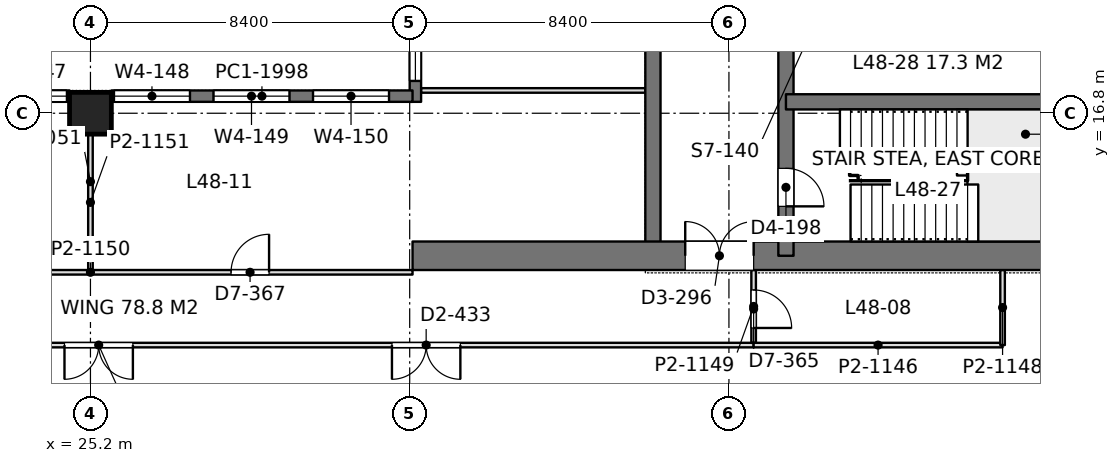
"""IFC4 building model, lengths in metres.
Left out: names, types, materials, properties, quantities, classifications, styles, units other than length and angle.
Written with IfcOpenShell. Run it as: python <this file> out.ifc"""

import sys

from ifc_helpers import new_model, si_unit, direction, frame, frame_2d, origin, origin_2d, place, context, subcontext, project, spatial, rectangle, extrude, element, fill, save


model = new_model("IFC4")
c1 = context("Model", 3, precision=1e-05, world=origin(), true_north=direction((0.0, 1.0)))
c2 = subcontext(c1, "Body", "Model", "MODEL_VIEW")
j1 = project(units=[si_unit("LENGTHUNIT", "METRE"), si_unit("PLANEANGLEUNIT", "RADIAN")], contexts=[c1])
p1 = place(None, origin())
s1 = spatial("IfcSite", under=j1, at=p1, CompositionType="ELEMENT")
p2 = place(p1, origin())
s2 = spatial("IfcBuilding", under=s1, at=p2, CompositionType="ELEMENT")
p3 = place(p2, frame((0.0, 0.0, 211.2)))
s3 = spatial("IfcBuildingStorey", under=s2, at=p3, CompositionType="ELEMENT", Elevation=211.2)
p4 = place(p3, frame((25.2, 16.8, 0.0), z_axis=(0.0, 0.0, 1.0), x_axis=(1.0, 0.0, 0.0)))
e1 = element("IfcColumn", 1, at=p4, inside=s3, PredefinedType="COLUMN", context=c2, shape_type="SweptSolid", body=[
    extrude(rectangle(XDim=1.1, YDim=1.1, at=origin_2d()), origin(), (0.0, 0.0, 1.0), 4.2),
])
p5 = place(p3, frame((33.675, 13.05, 0.0), z_axis=(0.0, 0.0, 1.0), x_axis=(1.0, 0.0, 0.0)))
e2 = element("IfcWall", 2, at=p5, inside=s3, PredefinedType="SHEAR", context=c2, shape_type="SweptSolid", body=[
    extrude(rectangle(XDim=17.85, YDim=0.75, at=frame_2d((8.925, 0.0))), origin(), (0.0, 0.0, 1.0), 4.2),
])
p6 = place(p5, frame((7.175, 0.0, 0.0)))
e3 = element("IfcOpeningElement", 3, at=p6, cuts=e2, PredefinedType="OPENING", context=c2, shape_type="SweptSolid", body=[
    extrude(rectangle(XDim=1.8, YDim=2.4, at=frame_2d((0.9, 1.2))), frame((0.0, 0.385, 0.0), z_axis=(0.0, -1.0, 0.0), x_axis=(1.0, 0.0, 0.0)), (0.0, 0.0, 1.0), 0.77),
])
p7 = place(p3, frame((43.5, 13.05, 0.0), z_axis=(0.0, 0.0, 1.0), x_axis=(0.0, 1.0, 0.0)))
e4 = element("IfcWall", 4, at=p7, inside=s3, PredefinedType="SHEAR", context=c2, shape_type="SweptSolid", body=[
    extrude(rectangle(XDim=24.3, YDim=0.4, at=frame_2d((12.15, 0.0))), origin(), (0.0, 0.0, 1.0), 4.2),
])
p8 = place(p7, frame((1.3, 0.0, 0.0)))
e5 = element("IfcOpeningElement", 5, at=p8, cuts=e4, PredefinedType="OPENING", context=c2, shape_type="SweptSolid", body=[
    extrude(rectangle(XDim=1.0, YDim=2.2, at=frame_2d((0.5, 1.1))), frame((0.0, 0.21, 0.0), z_axis=(0.0, -1.0, 0.0), x_axis=(1.0, 0.0, 0.0)), (0.0, 0.0, 1.0), 0.42),
])
p9 = place(p7, frame((22.0, 0.0, 0.0)))
e6 = element("IfcOpeningElement", 6, at=p9, cuts=e4, PredefinedType="OPENING", context=c2, shape_type="SweptSolid", body=[
    extrude(rectangle(XDim=1.0, YDim=2.2, at=frame_2d((0.5, 1.1))), frame((0.0, 0.21, 0.0), z_axis=(0.0, -1.0, 0.0), x_axis=(1.0, 0.0, 0.0)), (0.0, 0.0, 1.0), 0.42),
])
p10 = place(p7, frame((5.55, 0.0, 0.0)))
e7 = element("IfcOpeningElement", 7, at=p10, cuts=e4, PredefinedType="OPENING", context=c2, shape_type="SweptSolid", body=[
    extrude(rectangle(XDim=1.0, YDim=2.2, at=frame_2d((0.5, 1.1))), frame((0.0, 0.21, 0.0), z_axis=(0.0, -1.0, 0.0), x_axis=(1.0, 0.0, 0.0)), (0.0, 0.0, 1.0), 0.42),
])
p11 = place(p7, frame((9.55, 0.0, 0.0)))
e8 = element("IfcOpeningElement", 8, at=p11, cuts=e4, PredefinedType="OPENING", context=c2, shape_type="SweptSolid", body=[
    extrude(rectangle(XDim=1.0, YDim=2.2, at=frame_2d((0.5, 1.1))), frame((0.0, 0.21, 0.0), z_axis=(0.0, -1.0, 0.0), x_axis=(1.0, 0.0, 0.0)), (0.0, 0.0, 1.0), 0.42),
])
p12 = place(p7, frame((12.8, 0.0, 0.0)))
e9 = element("IfcOpeningElement", 9, at=p12, cuts=e4, PredefinedType="OPENING", context=c2, shape_type="SweptSolid", body=[
    extrude(rectangle(XDim=1.1, YDim=2.2, at=frame_2d((0.55, 1.1))), frame((0.0, 0.21, 0.0), z_axis=(0.0, -1.0, 0.0), x_axis=(1.0, 0.0, 0.0)), (0.0, 0.0, 1.0), 0.42),
])
p13 = place(p7, frame((15.538, 0.0, 0.0)))
e10 = element("IfcOpeningElement", 10, at=p13, cuts=e4, PredefinedType="OPENING", context=c2, shape_type="SweptSolid", body=[
    extrude(rectangle(XDim=1.1, YDim=2.2, at=frame_2d((0.55, 1.1))), frame((0.0, 0.21, 0.0), z_axis=(0.0, -1.0, 0.0), x_axis=(1.0, 0.0, 0.0)), (0.0, 0.0, 1.0), 0.42),
])
p14 = place(p7, frame((18.262, 0.0, 0.0)))
e11 = element("IfcOpeningElement", 11, at=p14, cuts=e4, PredefinedType="OPENING", context=c2, shape_type="SweptSolid", body=[
    extrude(rectangle(XDim=1.1, YDim=2.2, at=frame_2d((0.55, 1.1))), frame((0.0, 0.21, 0.0), z_axis=(0.0, -1.0, 0.0), x_axis=(1.0, 0.0, 0.0)), (0.0, 0.0, 1.0), 0.42),
])
p15 = place(p3, frame((40.0, 13.05, 0.0), z_axis=(0.0, 0.0, 1.0), x_axis=(0.0, 1.0, 0.0)))
e12 = element("IfcWall", 12, at=p15, inside=s3, PredefinedType="SHEAR", context=c2, shape_type="SweptSolid", body=[
    extrude(rectangle(XDim=24.3, YDim=0.4, at=frame_2d((12.15, 0.0))), origin(), (0.0, 0.0, 1.0), 4.2),
])
p16 = place(p15, frame((15.75, 0.0, 0.0)))
e13 = element("IfcOpeningElement", 13, at=p16, cuts=e12, PredefinedType="OPENING", context=c2, shape_type="SweptSolid", body=[
    extrude(rectangle(XDim=1.1, YDim=2.2, at=frame_2d((0.55, 1.1))), frame((0.0, 0.21, 0.0), z_axis=(0.0, -1.0, 0.0), x_axis=(1.0, 0.0, 0.0)), (0.0, 0.0, 1.0), 0.42),
])
p17 = place(p15, frame((18.6, 0.0, 0.0)))
e14 = element("IfcOpeningElement", 14, at=p17, cuts=e12, PredefinedType="OPENING", context=c2, shape_type="SweptSolid", body=[
    extrude(rectangle(XDim=1.1, YDim=2.2, at=frame_2d((0.55, 1.1))), frame((0.0, 0.21, 0.0), z_axis=(0.0, -1.0, 0.0), x_axis=(1.0, 0.0, 0.0)), (0.0, 0.0, 1.0), 0.42),
])
p18 = place(p15, frame((21.45, 0.0, 0.0)))
e15 = element("IfcOpeningElement", 15, at=p18, cuts=e12, PredefinedType="OPENING", context=c2, shape_type="SweptSolid", body=[
    extrude(rectangle(XDim=1.1, YDim=2.2, at=frame_2d((0.55, 1.1))), frame((0.0, 0.21, 0.0), z_axis=(0.0, -1.0, 0.0), x_axis=(1.0, 0.0, 0.0)), (0.0, 0.0, 1.0), 0.42),
])
p19 = place(p15, frame((6.05, 0.0, 0.0)))
e16 = element("IfcOpeningElement", 16, at=p19, cuts=e12, PredefinedType="OPENING", context=c2, shape_type="SweptSolid", body=[
    extrude(rectangle(XDim=1.8, YDim=2.4, at=frame_2d((0.9, 1.2))), frame((0.0, 0.21, 0.0), z_axis=(0.0, -1.0, 0.0), x_axis=(1.0, 0.0, 0.0)), (0.0, 0.0, 1.0), 0.42),
])
p20 = place(p15, frame((11.25, 0.0, 0.0)))
e17 = element("IfcOpeningElement", 17, at=p20, cuts=e12, PredefinedType="OPENING", context=c2, shape_type="SweptSolid", body=[
    extrude(rectangle(XDim=1.8, YDim=2.4, at=frame_2d((0.9, 1.2))), frame((0.0, 0.21, 0.0), z_axis=(0.0, -1.0, 0.0), x_axis=(1.0, 0.0, 0.0)), (0.0, 0.0, 1.0), 0.42),
])
p21 = place(p3, frame((51.15, 17.1, 0.0), z_axis=(0.0, 0.0, 1.0), x_axis=(-1.0, 0.0, 0.0)))
e18 = element("IfcWall", 18, at=p21, inside=s3, PredefinedType="SHEAR", context=c2, shape_type="SweptSolid", body=[
    extrude(rectangle(XDim=7.65, YDim=0.4, at=frame_2d((3.825, 0.0))), origin(), (0.0, 0.0, 1.0), 4.2),
])
p22 = place(p3, frame((33.75, 17.1, 0.0), z_axis=(0.0, 0.0, 1.0), x_axis=(0.0, 1.0, 0.0)))
e19 = element("IfcWall", 19, at=p22, inside=s3, PredefinedType="SOLIDWALL", context=c2, shape_type="SweptSolid", body=[
    extrude(rectangle(XDim=10.7, YDim=0.3, at=frame_2d((5.35, 0.0))), origin(), (0.0, 0.0, 1.0), 4.05),
])
p23 = place(p22, frame((0.55, 0.0, 0.9)))
e20 = element("IfcOpeningElement", 20, at=p23, cuts=e19, PredefinedType="OPENING", context=c2, shape_type="SweptSolid", body=[
    extrude(rectangle(XDim=2.0, YDim=1.9, at=frame_2d((1.0, 0.95))), frame((0.0, 0.16, 0.0), z_axis=(0.0, -1.0, 0.0), x_axis=(1.0, 0.0, 0.0)), (0.0, 0.0, 1.0), 0.32),
])
p24 = place(p22, frame((2.9, 0.0, 0.9)))
e21 = element("IfcOpeningElement", 21, at=p24, cuts=e19, PredefinedType="OPENING", context=c2, shape_type="SweptSolid", body=[
    extrude(rectangle(XDim=2.0, YDim=1.9, at=frame_2d((1.0, 0.95))), frame((0.0, 0.16, 0.0), z_axis=(0.0, -1.0, 0.0), x_axis=(1.0, 0.0, 0.0)), (0.0, 0.0, 1.0), 0.32),
])
p25 = place(p22, frame((7.675, 0.0, 0.9)))
e22 = element("IfcOpeningElement", 22, at=p25, cuts=e19, PredefinedType="OPENING", context=c2, shape_type="SweptSolid", body=[
    extrude(rectangle(XDim=2.0, YDim=1.9, at=frame_2d((1.0, 0.95))), frame((0.0, 0.16, 0.0), z_axis=(0.0, -1.0, 0.0), x_axis=(1.0, 0.0, 0.0)), (0.0, 0.0, 1.0), 0.32),
])
p26 = place(p3, frame((16.725, 17.25, 0.0), z_axis=(0.0, 0.0, 1.0), x_axis=(1.0, 0.0, 0.0)))
e23 = element("IfcWall", 23, at=p26, inside=s3, PredefinedType="SOLIDWALL", context=c2, shape_type="SweptSolid", body=[
    extrude(rectangle(XDim=7.925, YDim=0.3, at=frame_2d((3.962, 0.0))), origin(), (0.0, 0.0, 1.0), 4.05),
])
p27 = place(p26, frame((0.619, 0.0, 0.9)))
e24 = element("IfcOpeningElement", 24, at=p27, cuts=e23, PredefinedType="OPENING", context=c2, shape_type="SweptSolid", body=[
    extrude(rectangle(XDim=2.0, YDim=1.9, at=frame_2d((1.0, 0.95))), frame((0.0, 0.16, 0.0), z_axis=(0.0, -1.0, 0.0), x_axis=(1.0, 0.0, 0.0)), (0.0, 0.0, 1.0), 0.32),
])
p28 = place(p26, frame((3.238, 0.0, 0.9)))
e25 = element("IfcOpeningElement", 25, at=p28, cuts=e23, PredefinedType="OPENING", context=c2, shape_type="SweptSolid", body=[
    extrude(rectangle(XDim=2.0, YDim=1.9, at=frame_2d((1.0, 0.95))), frame((0.0, 0.16, 0.0), z_axis=(0.0, -1.0, 0.0), x_axis=(1.0, 0.0, 0.0)), (0.0, 0.0, 1.0), 0.32),
])
p29 = place(p26, frame((5.856, 0.0, 0.9)))
e26 = element("IfcOpeningElement", 26, at=p29, cuts=e23, PredefinedType="OPENING", context=c2, shape_type="SweptSolid", body=[
    extrude(rectangle(XDim=2.0, YDim=1.9, at=frame_2d((1.0, 0.95))), frame((0.0, 0.16, 0.0), z_axis=(0.0, -1.0, 0.0), x_axis=(1.0, 0.0, 0.0)), (0.0, 0.0, 1.0), 0.32),
])
p30 = place(p3, frame((25.75, 17.25, 0.0), z_axis=(0.0, 0.0, 1.0), x_axis=(1.0, 0.0, 0.0)))
e27 = element("IfcWall", 27, at=p30, inside=s3, PredefinedType="SOLIDWALL", context=c2, shape_type="SweptSolid", body=[
    extrude(rectangle(XDim=7.925, YDim=0.3, at=frame_2d((3.962, 0.0))), origin(), (0.0, 0.0, 1.0), 4.05),
])
p31 = place(p30, frame((0.069, 0.0, 0.9)))
e28 = element("IfcOpeningElement", 28, at=p31, cuts=e27, PredefinedType="OPENING", context=c2, shape_type="SweptSolid", body=[
    extrude(rectangle(XDim=2.0, YDim=1.9, at=frame_2d((1.0, 0.95))), frame((0.0, 0.16, 0.0), z_axis=(0.0, -1.0, 0.0), x_axis=(1.0, 0.0, 0.0)), (0.0, 0.0, 1.0), 0.32),
])
p32 = place(p30, frame((2.688, 0.0, 0.9)))
e29 = element("IfcOpeningElement", 29, at=p32, cuts=e27, PredefinedType="OPENING", context=c2, shape_type="SweptSolid", body=[
    extrude(rectangle(XDim=2.0, YDim=1.9, at=frame_2d((1.0, 0.95))), frame((0.0, 0.16, 0.0), z_axis=(0.0, -1.0, 0.0), x_axis=(1.0, 0.0, 0.0)), (0.0, 0.0, 1.0), 0.32),
])
p33 = place(p30, frame((5.306, 0.0, 0.9)))
e30 = element("IfcOpeningElement", 30, at=p33, cuts=e27, PredefinedType="OPENING", context=c2, shape_type="SweptSolid", body=[
    extrude(rectangle(XDim=2.0, YDim=1.9, at=frame_2d((1.0, 0.95))), frame((0.0, 0.16, 0.0), z_axis=(0.0, -1.0, 0.0), x_axis=(1.0, 0.0, 0.0)), (0.0, 0.0, 1.0), 0.32),
])
p34 = place(p3, frame((33.898, 17.4, 0.0), z_axis=(0.0, 0.0, 1.0), x_axis=(1.0, 0.0, 0.0)))
e31 = element("IfcWall", 31, at=p34, inside=s3, PredefinedType="PARTITIONING", context=c2, shape_type="SweptSolid", body=[
    extrude(rectangle(XDim=5.904, YDim=0.12, at=frame_2d((2.952, 0.0))), origin(), (0.0, 0.0, 1.0), 3.55),
])
p35 = place(p3, frame((1.2, 10.7, 0.0), z_axis=(0.0, 0.0, 1.0), x_axis=(1.0, 0.0, 0.0)))
e32 = element("IfcWall", 32, at=p35, inside=s3, PredefinedType="PARTITIONING", context=c2, shape_type="SweptSolid", body=[
    extrude(rectangle(XDim=41.452, YDim=0.12, at=frame_2d((20.726, 0.0))), origin(), (0.0, 0.0, 1.0), 3.55),
])
p36 = place(p35, frame((4.3, 0.0, 0.0)))
e33 = element("IfcOpeningElement", 33, at=p36, cuts=e32, PredefinedType="OPENING", context=c2, shape_type="SweptSolid", body=[
    extrude(rectangle(XDim=1.8, YDim=2.2, at=frame_2d((0.9, 1.1))), frame((0.0, 0.07, 0.0), z_axis=(0.0, -1.0, 0.0), x_axis=(1.0, 0.0, 0.0)), (0.0, 0.0, 1.0), 0.14),
])
p37 = place(p35, frame((9.5, 0.0, 0.0)))
e34 = element("IfcOpeningElement", 34, at=p37, cuts=e32, PredefinedType="OPENING", context=c2, shape_type="SweptSolid", body=[
    extrude(rectangle(XDim=1.8, YDim=2.2, at=frame_2d((0.9, 1.1))), frame((0.0, 0.07, 0.0), z_axis=(0.0, -1.0, 0.0), x_axis=(1.0, 0.0, 0.0)), (0.0, 0.0, 1.0), 0.14),
])
p38 = place(p35, frame((23.317, 0.0, 0.0)))
e35 = element("IfcOpeningElement", 35, at=p38, cuts=e32, PredefinedType="OPENING", context=c2, shape_type="SweptSolid", body=[
    extrude(rectangle(XDim=1.8, YDim=2.2, at=frame_2d((0.9, 1.1))), frame((0.0, 0.07, 0.0), z_axis=(0.0, -1.0, 0.0), x_axis=(1.0, 0.0, 0.0)), (0.0, 0.0, 1.0), 0.14),
])
p39 = place(p35, frame((31.933, 0.0, 0.0)))
e36 = element("IfcOpeningElement", 36, at=p39, cuts=e32, PredefinedType="OPENING", context=c2, shape_type="SweptSolid", body=[
    extrude(rectangle(XDim=1.8, YDim=2.2, at=frame_2d((0.9, 1.1))), frame((0.0, 0.07, 0.0), z_axis=(0.0, -1.0, 0.0), x_axis=(1.0, 0.0, 0.0)), (0.0, 0.0, 1.0), 0.14),
])
p40 = place(p3, frame((42.65, 10.758, 0.0), z_axis=(0.0, 0.0, 1.0), x_axis=(0.0, 1.0, 0.0)))
e37 = element("IfcWall", 37, at=p40, inside=s3, PredefinedType="PARTITIONING", context=c2, shape_type="SweptSolid", body=[
    extrude(rectangle(XDim=1.918, YDim=0.12, at=frame_2d((0.959, 0.0))), origin(), (0.0, 0.0, 1.0), 4.05),
])
p41 = place(p40, frame((0.392, 0.0, 0.0)))
e38 = element("IfcOpeningElement", 38, at=p41, cuts=e37, PredefinedType="OPENING", context=c2, shape_type="SweptSolid", body=[
    extrude(rectangle(XDim=1.0, YDim=2.4, at=frame_2d((0.5, 1.2))), frame((0.0, 0.07, 0.0), z_axis=(0.0, -1.0, 0.0), x_axis=(1.0, 0.0, 0.0)), (0.0, 0.0, 1.0), 0.14),
])
p42 = place(p3, frame((42.648, 10.7, 0.0), z_axis=(0.0, 0.0, 1.0), x_axis=(1.0, 0.0, 0.0)))
e39 = element("IfcWall", 39, at=p42, inside=s3, PredefinedType="PARTITIONING", context=c2, shape_type="SweptSolid", body=[
    extrude(rectangle(XDim=6.552, YDim=0.12, at=frame_2d((3.276, 0.0))), origin(), (0.0, 0.0, 1.0), 4.05),
])
p43 = place(p3, frame((49.2, 10.7, 0.0), z_axis=(0.0, 0.0, 1.0), x_axis=(0.0, 1.0, 0.0)))
e40 = element("IfcWall", 40, at=p43, inside=s3, PredefinedType="PARTITIONING", context=c2, shape_type="SweptSolid", body=[
    extrude(rectangle(XDim=1.976, YDim=0.12, at=frame_2d((0.988, 0.0))), origin(), (0.0, 0.0, 1.0), 4.05),
])
p44 = place(p3, frame((25.2, 12.658, 0.0), z_axis=(0.0, 0.0, 1.0), x_axis=(0.0, 1.0, 0.0)))
e41 = element("IfcWall", 41, at=p44, inside=s3, PredefinedType="PARTITIONING", context=c2, shape_type="SweptSolid", body=[
    extrude(rectangle(XDim=3.593, YDim=0.12, at=frame_2d((1.796, 0.0))), origin(), (0.0, 0.0, 1.0), 3.55),
])
p45 = place(p3, frame((16.725, 12.615, 0.0), z_axis=(0.0, 0.0, 1.0), x_axis=(1.0, 0.0, 0.0)))
e42 = element("IfcWall", 42, at=p45, inside=s3, PredefinedType="PARTITIONING", context=c2, shape_type="SweptSolid", body=[
    extrude(rectangle(XDim=16.95, YDim=0.12, at=frame_2d((8.475, 0.0))), origin(), (0.0, 0.0, 1.0), 3.55),
])
p46 = place(p45, frame((3.775, 0.0, 0.0)))
e43 = element("IfcOpeningElement", 43, at=p46, cuts=e42, PredefinedType="OPENING", context=c2, shape_type="SweptSolid", body=[
    extrude(rectangle(XDim=1.0, YDim=2.4, at=frame_2d((0.5, 1.2))), frame((0.0, 0.07, 0.0), z_axis=(0.0, -1.0, 0.0), x_axis=(1.0, 0.0, 0.0)), (0.0, 0.0, 1.0), 0.14),
])
p47 = place(p45, frame((12.175, 0.0, 0.0)))
e44 = element("IfcOpeningElement", 44, at=p47, cuts=e42, PredefinedType="OPENING", context=c2, shape_type="SweptSolid", body=[
    extrude(rectangle(XDim=1.0, YDim=2.4, at=frame_2d((0.5, 1.2))), frame((0.0, 0.07, 0.0), z_axis=(0.0, -1.0, 0.0), x_axis=(1.0, 0.0, 0.0)), (0.0, 0.0, 1.0), 0.14),
])
p48 = place(p23, origin())
e45 = element("IfcWindow", 45, at=p48, inside=s3, PartitioningType="SINGLE_PANEL", PredefinedType="WINDOW", context=c2, shape_type="SweptSolid", body=[
    extrude(rectangle(XDim=2.0, YDim=1.9, at=frame_2d((1.0, 0.95))), frame((0.0, 0.03, 0.0), z_axis=(0.0, -1.0, 0.0), x_axis=(1.0, 0.0, 0.0)), (0.0, 0.0, 1.0), 0.06),
])
fill(e20, e45)
p49 = place(p29, origin())
e46 = element("IfcWindow", 46, at=p49, inside=s3, PartitioningType="SINGLE_PANEL", PredefinedType="WINDOW", context=c2, shape_type="SweptSolid", body=[
    extrude(rectangle(XDim=2.0, YDim=1.9, at=frame_2d((1.0, 0.95))), frame((0.0, 0.03, 0.0), z_axis=(0.0, -1.0, 0.0), x_axis=(1.0, 0.0, 0.0)), (0.0, 0.0, 1.0), 0.06),
])
fill(e26, e46)
p50 = place(p31, origin())
e47 = element("IfcWindow", 47, at=p50, inside=s3, PartitioningType="SINGLE_PANEL", PredefinedType="WINDOW", context=c2, shape_type="SweptSolid", body=[
    extrude(rectangle(XDim=2.0, YDim=1.9, at=frame_2d((1.0, 0.95))), frame((0.0, 0.03, 0.0), z_axis=(0.0, -1.0, 0.0), x_axis=(1.0, 0.0, 0.0)), (0.0, 0.0, 1.0), 0.06),
])
fill(e28, e47)
p51 = place(p32, origin())
e48 = element("IfcWindow", 48, at=p51, inside=s3, PartitioningType="SINGLE_PANEL", PredefinedType="WINDOW", context=c2, shape_type="SweptSolid", body=[
    extrude(rectangle(XDim=2.0, YDim=1.9, at=frame_2d((1.0, 0.95))), frame((0.0, 0.03, 0.0), z_axis=(0.0, -1.0, 0.0), x_axis=(1.0, 0.0, 0.0)), (0.0, 0.0, 1.0), 0.06),
])
fill(e29, e48)
p52 = place(p33, origin())
e49 = element("IfcWindow", 49, at=p52, inside=s3, PartitioningType="SINGLE_PANEL", PredefinedType="WINDOW", context=c2, shape_type="SweptSolid", body=[
    extrude(rectangle(XDim=2.0, YDim=1.9, at=frame_2d((1.0, 0.95))), frame((0.0, 0.03, 0.0), z_axis=(0.0, -1.0, 0.0), x_axis=(1.0, 0.0, 0.0)), (0.0, 0.0, 1.0), 0.06),
])
fill(e30, e49)
p53 = place(p6, origin())
e50 = element("IfcDoor", 50, at=p53, inside=s3, OperationType="DOUBLE_DOOR_SINGLE_SWING", PredefinedType="DOOR", context=c2, shape_type="SweptSolid", body=[
    extrude(rectangle(XDim=1.8, YDim=2.4, at=frame_2d((0.9, 1.2))), frame((0.0, 0.025, 0.0), z_axis=(0.0, -1.0, 0.0), x_axis=(1.0, 0.0, 0.0)), (0.0, 0.0, 1.0), 0.05),
])
fill(e3, e50)
p54 = place(p8, frame((1.0, 0.0, 0.0), z_axis=(0.0, 0.0, 1.0), x_axis=(-1.0, 0.0, 0.0)))
e51 = element("IfcDoor", 51, at=p54, inside=s3, OperationType="SINGLE_SWING_RIGHT", PredefinedType="DOOR", context=c2, shape_type="SweptSolid", body=[
    extrude(rectangle(XDim=1.0, YDim=2.2, at=frame_2d((0.5, 1.1))), frame((0.0, 0.025, 0.0), z_axis=(0.0, -1.0, 0.0), x_axis=(1.0, 0.0, 0.0)), (0.0, 0.0, 1.0), 0.05),
])
fill(e5, e51)
p55 = place(p38, frame((1.8, 0.0, 0.0), z_axis=(0.0, 0.0, 1.0), x_axis=(-1.0, 0.0, 0.0)))
e52 = element("IfcDoor", 52, at=p55, inside=s3, OperationType="DOUBLE_DOOR_SINGLE_SWING", PredefinedType="DOOR", context=c2, shape_type="SweptSolid", body=[
    extrude(rectangle(XDim=1.8, YDim=2.2, at=frame_2d((0.9, 1.1))), frame((0.0, 0.025, 0.0), z_axis=(0.0, -1.0, 0.0), x_axis=(1.0, 0.0, 0.0)), (0.0, 0.0, 1.0), 0.05),
])
fill(e35, e52)
p56 = place(p39, frame((1.8, 0.0, 0.0), z_axis=(0.0, 0.0, 1.0), x_axis=(-1.0, 0.0, 0.0)))
e53 = element("IfcDoor", 53, at=p56, inside=s3, OperationType="DOUBLE_DOOR_SINGLE_SWING", PredefinedType="DOOR", context=c2, shape_type="SweptSolid", body=[
    extrude(rectangle(XDim=1.8, YDim=2.2, at=frame_2d((0.9, 1.1))), frame((0.0, 0.025, 0.0), z_axis=(0.0, -1.0, 0.0), x_axis=(1.0, 0.0, 0.0)), (0.0, 0.0, 1.0), 0.05),
])
fill(e36, e53)
p57 = place(p41, frame((1.0, 0.0, 0.0), z_axis=(0.0, 0.0, 1.0), x_axis=(-1.0, 0.0, 0.0)))
e54 = element("IfcDoor", 54, at=p57, inside=s3, OperationType="SINGLE_SWING_RIGHT", PredefinedType="DOOR", context=c2, shape_type="SweptSolid", body=[
    extrude(rectangle(XDim=1.0, YDim=2.4, at=frame_2d((0.5, 1.2))), frame((0.0, 0.025, 0.0), z_axis=(0.0, -1.0, 0.0), x_axis=(1.0, 0.0, 0.0)), (0.0, 0.0, 1.0), 0.05),
])
fill(e38, e54)
p58 = place(p47, origin())
e55 = element("IfcDoor", 55, at=p58, inside=s3, OperationType="SINGLE_SWING_RIGHT", PredefinedType="DOOR", context=c2, shape_type="SweptSolid", body=[
    extrude(rectangle(XDim=1.0, YDim=2.4, at=frame_2d((0.5, 1.2))), frame((0.0, 0.025, 0.0), z_axis=(0.0, -1.0, 0.0), x_axis=(1.0, 0.0, 0.0)), (0.0, 0.0, 1.0), 0.05),
])
fill(e44, e55)
save(model, sys.argv[1])
